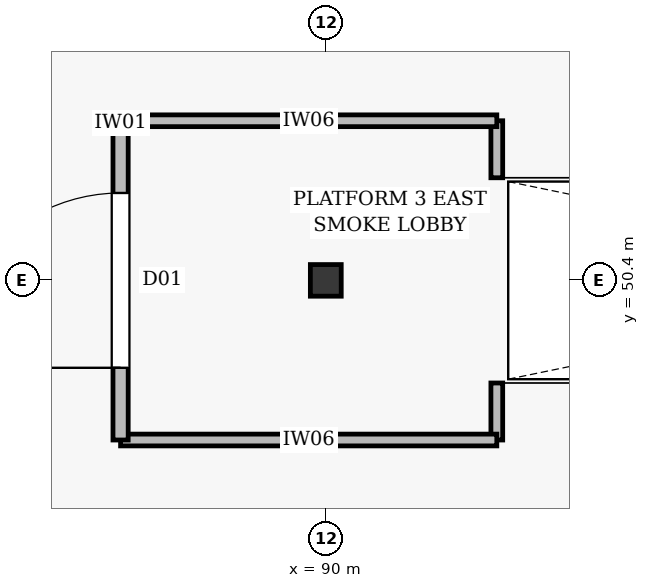
"""IFC4 building model, lengths in metres.
Left out: names, types, materials, properties, quantities, classifications, styles, units other than length and angle.
Written with IfcOpenShell. Run it as: python <this file> out.ifc"""

import sys

from ifc_helpers import new_model, si_unit, direction, frame, frame_2d, origin, origin_2d, place, context, subcontext, project, spatial, rectangle, i_section, extrude, element, fill, save


model = new_model("IFC4")
c1 = context("Model", 3, precision=1e-05, world=origin(), true_north=direction((0.0, 1.0)))
c2 = subcontext(c1, "Body", "Model", "MODEL_VIEW")
j1 = project(units=[si_unit("LENGTHUNIT", "METRE"), si_unit("PLANEANGLEUNIT", "RADIAN")], contexts=[c1])
p1 = place(None, origin())
s1 = spatial("IfcSite", under=j1, at=p1, CompositionType="ELEMENT")
p2 = place(p1, origin())
s2 = spatial("IfcBuilding", under=s1, at=p2, CompositionType="ELEMENT")
p3 = place(p2, frame((0.0, 0.0, 6.6)))
s3 = spatial("IfcBuildingStorey", under=s2, at=p3, CompositionType="ELEMENT", Elevation=6.6)
p4 = place(p3, frame((90.0, 50.4, 0.0), z_axis=(0.0, 0.0, 1.0), x_axis=(1.0, 0.0, 0.0)))
e1 = element("IfcColumn", 1, at=p4, inside=s3, PredefinedType="COLUMN", context=c2, shape_type="SweptSolid", body=[
    extrude(i_section(OverallWidth=0.406, OverallDepth=0.416, WebThickness=0.023, FlangeThickness=0.035, at=origin_2d()), origin(), (0.0, 0.0, 1.0), 6.0),
])
for number, where, z_axis, x_axis in (
    (2, (92.25, 48.3, 0.0), (0.0, 0.0, 1.0), (0.0, 1.0, 0.0)),
    (3, (92.25, 51.75, 0.0), (0.0, 0.0, 1.0), (0.0, 1.0, 0.0)),
):
    element("IfcWall", number, at=place(p3, frame(where, z_axis=z_axis, x_axis=x_axis)), inside=s3, PredefinedType="PARTITIONING", context=c2, shape_type="SweptSolid", body=[
        extrude(rectangle(XDim=0.75, YDim=0.155, at=frame_2d((0.375, 0.0))), origin(), (0.0, 0.0, 1.0), 2.62),
    ])
for number, where, z_axis, x_axis in (
    (4, (87.3, 48.3, 0.0), (0.0, 0.0, 1.0), (1.0, 0.0, 0.0)),
    (5, (87.3, 52.5, 0.0), (0.0, 0.0, 1.0), (1.0, 0.0, 0.0)),
):
    element("IfcWall", number, at=place(p3, frame(where, z_axis=z_axis, x_axis=x_axis)), inside=s3, PredefinedType="PARTITIONING", context=c2, shape_type="SweptSolid", body=[
        extrude(rectangle(XDim=4.95, YDim=0.155, at=frame_2d((2.475, 0.0))), origin(), (0.0, 0.0, 1.0), 2.62),
    ])
p5 = place(p3, frame((87.3, 48.3, 0.0), z_axis=(0.0, 0.0, 1.0), x_axis=(0.0, 1.0, 0.0)))
e6 = element("IfcWall", 6, at=p5, inside=s3, PredefinedType="PARTITIONING", context=c2, shape_type="SweptSolid", body=[
    extrude(rectangle(XDim=4.2, YDim=0.2, at=frame_2d((2.1, 0.0))), origin(), (0.0, 0.0, 1.0), 2.62),
])
p6 = place(p5, frame((0.95, 0.0, 0.005)))
e7 = element("IfcOpeningElement", 7, at=p6, cuts=e6, PredefinedType="OPENING", context=c2, shape_type="SweptSolid", body=[
    extrude(rectangle(XDim=2.3, YDim=2.4, at=frame_2d((1.15, 1.2))), frame((0.0, 0.112, 0.0), z_axis=(0.0, -1.0, 0.0), x_axis=(1.0, 0.0, 0.0)), (0.0, 0.0, 1.0), 0.224),
])
p7 = place(p6, origin())
e8 = element("IfcDoor", 8, at=p7, inside=s3, OperationType="DOUBLE_DOOR_SINGLE_SWING", PredefinedType="DOOR", context=c2, shape_type="SweptSolid", body=[
    extrude(rectangle(XDim=2.3, YDim=2.4, at=frame_2d((1.15, 1.2))), frame((0.0, 0.025, 0.0), z_axis=(0.0, -1.0, 0.0), x_axis=(1.0, 0.0, 0.0)), (0.0, 0.0, 1.0), 0.05),
])
fill(e7, e8)
save(model, sys.argv[1])
